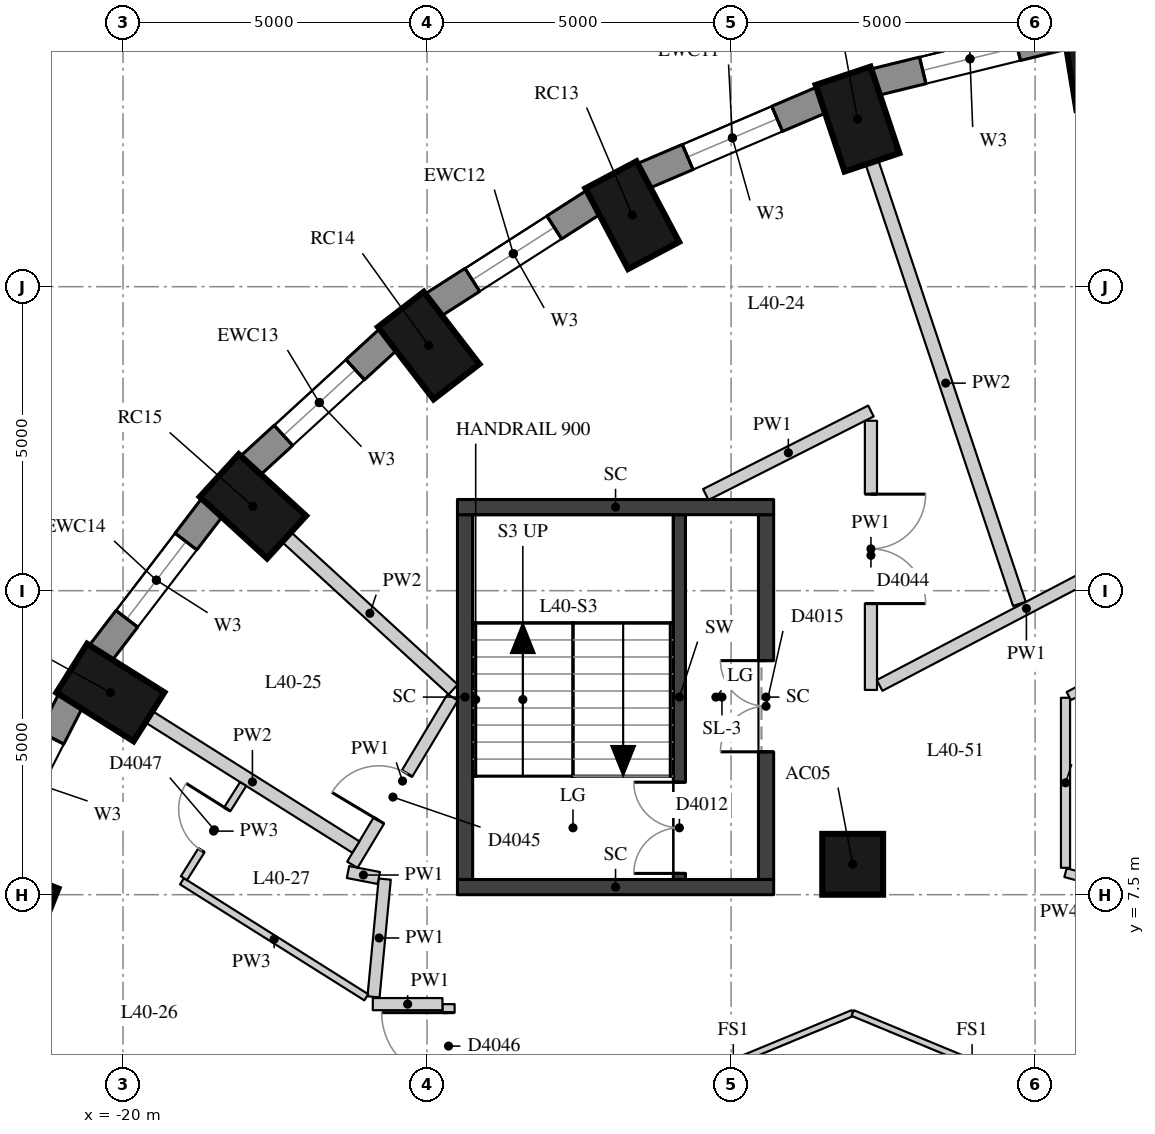
"""IFC4 building model, lengths in metres.
Left out: names, types, materials, properties, quantities, classifications, styles, units other than length and angle.
Written with IfcOpenShell. Run it as: python <this file> out.ifc"""

import sys

from ifc_helpers import new_model, si_unit, direction, frame, frame_2d, origin, origin_2d, place, context, subcontext, project, spatial, rectangle, extrude, element, fill, save


model = new_model("IFC4")
c1 = context("Model", 3, precision=1e-05, world=origin(), true_north=direction((0.0, 1.0)))
c2 = subcontext(c1, "Body", "Model", "MODEL_VIEW")
j1 = project(units=[si_unit("LENGTHUNIT", "METRE"), si_unit("PLANEANGLEUNIT", "RADIAN")], contexts=[c1])
p1 = place(None, origin())
s1 = spatial("IfcSite", under=j1, at=p1, CompositionType="ELEMENT")
p2 = place(p1, origin())
s2 = spatial("IfcBuilding", under=s1, at=p2, CompositionType="ELEMENT")
p3 = place(p2, frame((0.0, 0.0, 145.1)))
s3 = spatial("IfcBuildingStorey", under=s2, at=p3, CompositionType="ELEMENT", Elevation=145.1)
for number, where, z_axis, x_axis in (
    (1, (-3.972, 21.224, 0.0), (0.0, 0.0, 1.0), (-0.16, 0.987, 0.0)),
    (2, (-7.92, 20.256, 0.0), (0.0, 0.0, 1.0), (-0.317, 0.949, 0.0)),
    (3, (-11.625, 18.676, 0.0), (0.0, 0.0, 1.0), (-0.468, 0.884, 0.0)),
    (4, (-14.973, 16.532, 0.0), (0.0, 0.0, 1.0), (-0.61, 0.792, 0.0)),
    (5, (-17.864, 13.888, 0.0), (0.0, 0.0, 1.0), (-0.738, 0.675, 0.0)),
    (6, (-20.208, 10.825, 0.0), (0.0, 0.0, 1.0), (-0.846, 0.533, 0.0)),
    (7, (-21.936, 7.436, 0.0), (0.0, 0.0, 1.0), (-0.93, 0.369, 0.0)),
):
    element("IfcColumn", number, at=place(p3, frame(where, z_axis=z_axis, x_axis=x_axis)), inside=s3, PredefinedType="COLUMN", context=c2, shape_type="SweptSolid", body=[
        extrude(rectangle(XDim=1.5, YDim=0.95, at=origin_2d()), origin(), (0.0, 0.0, 1.0), 3.3),
    ])
p4 = place(p3, frame((-8.0, 8.0, 0.0), z_axis=(0.0, 0.0, 1.0), x_axis=(1.0, 0.0, 0.0)))
e8 = element("IfcColumn", 8, at=p4, inside=s3, PredefinedType="COLUMN", context=c2, shape_type="SweptSolid", body=[
    extrude(rectangle(XDim=1.0, YDim=1.0, at=origin_2d()), origin(), (0.0, 0.0, 1.0), 3.3),
])
p5 = place(p3, frame((-4.499, 21.633, 0.0), z_axis=(0.0, 0.0, 1.0), x_axis=(-0.971232901476, -0.238131583563, 0.0)))
e9 = element("IfcWall", 9, at=p5, inside=s3, PredefinedType="SOLIDWALL", context=c2, shape_type="SweptSolid", body=[
    extrude(rectangle(XDim=3.237, YDim=0.45, at=frame_2d((1.618, 0.0))), origin(), (0.0, 0.0, 1.0), 3.02),
])
p6 = place(p5, frame((0.818, 0.0, 0.4)))
e10 = element("IfcOpeningElement", 10, at=p6, cuts=e9, PredefinedType="OPENING", context=c2, shape_type="SweptSolid", body=[
    extrude(rectangle(XDim=1.6, YDim=1.75, at=frame_2d((0.8, 0.875))), frame((0.0, 0.235, 0.0), z_axis=(0.0, -1.0, 0.0), x_axis=(1.0, 0.0, 0.0)), (0.0, 0.0, 1.0), 0.47),
])
p7 = place(p3, frame((-8.506, 20.574, 0.0), z_axis=(0.0, 0.0, 1.0), x_axis=(-0.919798725687, -0.392390499663, 0.0)))
e11 = element("IfcWall", 11, at=p7, inside=s3, PredefinedType="SOLIDWALL", context=c2, shape_type="SweptSolid", body=[
    extrude(rectangle(XDim=3.2, YDim=0.45, at=frame_2d((1.6, 0.0))), origin(), (0.0, 0.0, 1.0), 3.02),
])
p8 = place(p7, frame((0.8, 0.0, 0.4)))
e12 = element("IfcOpeningElement", 12, at=p8, cuts=e11, PredefinedType="OPENING", context=c2, shape_type="SweptSolid", body=[
    extrude(rectangle(XDim=1.6, YDim=1.75, at=frame_2d((0.8, 0.875))), frame((0.0, 0.235, 0.0), z_axis=(0.0, -1.0, 0.0), x_axis=(1.0, 0.0, 0.0)), (0.0, 0.0, 1.0), 0.47),
])
p9 = place(p3, frame((-12.255, 18.893, 0.0), z_axis=(0.0, 0.0, 1.0), x_axis=(-0.842030726237, -0.539429565442, 0.0)))
e13 = element("IfcWall", 13, at=p9, inside=s3, PredefinedType="SOLIDWALL", context=c2, shape_type="SweptSolid", body=[
    extrude(rectangle(XDim=3.151, YDim=0.45, at=frame_2d((1.576, 0.0))), origin(), (0.0, 0.0, 1.0), 3.02),
])
p10 = place(p9, frame((0.776, 0.0, 0.4)))
e14 = element("IfcOpeningElement", 14, at=p10, cuts=e13, PredefinedType="OPENING", context=c2, shape_type="SweptSolid", body=[
    extrude(rectangle(XDim=1.6, YDim=1.75, at=frame_2d((0.8, 0.875))), frame((0.0, 0.235, 0.0), z_axis=(0.0, -1.0, 0.0), x_axis=(1.0, 0.0, 0.0)), (0.0, 0.0, 1.0), 0.47),
])
p11 = place(p3, frame((-15.63, 16.639, 0.0), z_axis=(0.0, 0.0, 1.0), x_axis=(-0.737808755941, -0.675009807082, 0.0)))
e15 = element("IfcWall", 15, at=p11, inside=s3, PredefinedType="SOLIDWALL", context=c2, shape_type="SweptSolid", body=[
    extrude(rectangle(XDim=3.094, YDim=0.45, at=frame_2d((1.547, 0.0))), origin(), (0.0, 0.0, 1.0), 3.02),
])
p12 = place(p11, frame((0.747, 0.0, 0.4)))
e16 = element("IfcOpeningElement", 16, at=p12, cuts=e15, PredefinedType="OPENING", context=c2, shape_type="SweptSolid", body=[
    extrude(rectangle(XDim=1.6, YDim=1.75, at=frame_2d((0.8, 0.875))), frame((0.0, 0.235, 0.0), z_axis=(0.0, -1.0, 0.0), x_axis=(1.0, 0.0, 0.0)), (0.0, 0.0, 1.0), 0.47),
])
p13 = place(p3, frame((-18.528, 13.879, 0.0), z_axis=(0.0, 0.0, 1.0), x_axis=(-0.607817056371, -0.794077090706, 0.0)))
e17 = element("IfcWall", 17, at=p13, inside=s3, PredefinedType="SOLIDWALL", context=c2, shape_type="SweptSolid", body=[
    extrude(rectangle(XDim=3.037, YDim=0.45, at=frame_2d((1.519, 0.0))), origin(), (0.0, 0.0, 1.0), 3.02),
])
p14 = place(p13, frame((0.719, 0.0, 0.4)))
e18 = element("IfcOpeningElement", 18, at=p14, cuts=e17, PredefinedType="OPENING", context=c2, shape_type="SweptSolid", body=[
    extrude(rectangle(XDim=1.6, YDim=1.75, at=frame_2d((0.8, 0.875))), frame((0.0, 0.235, 0.0), z_axis=(0.0, -1.0, 0.0), x_axis=(1.0, 0.0, 0.0)), (0.0, 0.0, 1.0), 0.47),
])
p15 = place(p3, frame((-20.859, 10.697, 0.0), z_axis=(0.0, 0.0, 1.0), x_axis=(-0.454133999889, -0.890933392653, 0.0)))
e19 = element("IfcWall", 19, at=p15, inside=s3, PredefinedType="SOLIDWALL", context=c2, shape_type="SweptSolid", body=[
    extrude(rectangle(XDim=2.986, YDim=0.45, at=frame_2d((1.493, 0.0))), origin(), (0.0, 0.0, 1.0), 3.02),
])
p16 = place(p15, frame((0.693, 0.0, 0.4)))
e20 = element("IfcOpeningElement", 20, at=p16, cuts=e19, PredefinedType="OPENING", context=c2, shape_type="SweptSolid", body=[
    extrude(rectangle(XDim=1.6, YDim=1.75, at=frame_2d((0.8, 0.875))), frame((0.0, 0.235, 0.0), z_axis=(0.0, -1.0, 0.0), x_axis=(1.0, 0.0, 0.0)), (0.0, 0.0, 1.0), 0.47),
])
p17 = place(p3, frame((-10.85, 7.75, 0.0), z_axis=(0.0, 0.0, 1.0), x_axis=(0.0, 1.0, 0.0)))
e21 = element("IfcWall", 21, at=p17, inside=s3, PredefinedType="SHEAR", context=c2, shape_type="SweptSolid", body=[
    extrude(rectangle(XDim=6.0, YDim=0.2, at=frame_2d((3.0, 0.0))), origin(), (0.0, 0.0, 1.0), 3.02),
])
p18 = place(p17, frame((0.1, 0.0, 0.0)))
e22 = element("IfcOpeningElement", 22, at=p18, cuts=e21, PredefinedType="OPENING", context=c2, shape_type="SweptSolid", body=[
    extrude(rectangle(XDim=1.5, YDim=2.1, at=frame_2d((0.75, 1.05))), frame((0.0, 0.11, 0.0), z_axis=(0.0, -1.0, 0.0), x_axis=(1.0, 0.0, 0.0)), (0.0, 0.0, 1.0), 0.22),
])
p19 = place(p3, frame((-14.375, 7.75, -0.28), z_axis=(0.0, 0.0, 1.0), x_axis=(0.0, 1.0, 0.0)))
e23 = element("IfcWall", 23, at=p19, inside=s3, PredefinedType="SHEAR", context=c2, shape_type="SweptSolid", body=[
    extrude(rectangle(XDim=6.0, YDim=0.25, at=frame_2d((3.0, 0.0))), origin(), (0.0, 0.0, 1.0), 3.3),
])
p20 = place(p3, frame((-9.425, 7.75, -0.28), z_axis=(0.0, 0.0, 1.0), x_axis=(0.0, 1.0, 0.0)))
e24 = element("IfcWall", 24, at=p20, inside=s3, PredefinedType="SHEAR", context=c2, shape_type="SweptSolid", body=[
    extrude(rectangle(XDim=6.0, YDim=0.25, at=frame_2d((3.0, 0.0))), origin(), (0.0, 0.0, 1.0), 3.3),
])
p21 = place(p20, frame((2.1, 0.0, 0.28)))
e25 = element("IfcOpeningElement", 25, at=p21, cuts=e24, PredefinedType="OPENING", context=c2, shape_type="SweptSolid", body=[
    extrude(rectangle(XDim=1.5, YDim=2.1, at=frame_2d((0.75, 1.05))), frame((0.0, 0.135, 0.0), z_axis=(0.0, -1.0, 0.0), x_axis=(1.0, 0.0, 0.0)), (0.0, 0.0, 1.0), 0.27),
])
for number, where, z_axis, x_axis in (
    (26, (-14.5, 13.875, -0.28), (0.0, 0.0, 1.0), (1.0, 0.0, 0.0)),
    (27, (-14.5, 7.625, -0.28), (0.0, 0.0, 1.0), (1.0, 0.0, 0.0)),
):
    element("IfcWall", number, at=place(p3, frame(where, z_axis=z_axis, x_axis=x_axis)), inside=s3, PredefinedType="SHEAR", context=c2, shape_type="SweptSolid", body=[
        extrude(rectangle(XDim=5.2, YDim=0.25, at=frame_2d((2.6, 0.0))), origin(), (0.0, 0.0, 1.0), 3.3),
    ])
p22 = place(p3, frame((-14.647, -5.6, 0.0), z_axis=(0.0, 0.0, 1.0), x_axis=(0.0, 1.0, 0.0)))
e28 = element("IfcWall", 28, at=p22, inside=s3, PredefinedType="PARTITIONING", context=c2, shape_type="SweptSolid", body=[
    extrude(rectangle(XDim=11.3, YDim=0.2, at=frame_2d((5.65, 0.0))), origin(), (0.0, 0.0, 1.0), 3.02),
])
p23 = place(p22, frame((10.06, 0.0, 0.0)))
e29 = element("IfcOpeningElement", 29, at=p23, cuts=e28, PredefinedType="OPENING", context=c2, shape_type="SweptSolid", body=[
    extrude(rectangle(XDim=1.1, YDim=2.1, at=frame_2d((0.55, 1.05))), frame((0.0, 0.11, 0.0), z_axis=(0.0, -1.0, 0.0), x_axis=(1.0, 0.0, 0.0)), (0.0, 0.0, 1.0), 0.22),
])
p24 = place(p22, frame((3.639, 0.0, 0.0)))
e30 = element("IfcOpeningElement", 30, at=p24, cuts=e28, PredefinedType="OPENING", context=c2, shape_type="SweptSolid", body=[
    extrude(rectangle(XDim=1.2, YDim=2.1, at=frame_2d((0.6, 1.05))), frame((0.0, 0.11, 0.0), z_axis=(0.0, -1.0, 0.0), x_axis=(1.0, 0.0, 0.0)), (0.0, 0.0, 1.0), 0.22),
])
p25 = place(p22, frame((0.14, 0.0, 0.0)))
e31 = element("IfcOpeningElement", 31, at=p25, cuts=e28, PredefinedType="OPENING", context=c2, shape_type="SweptSolid", body=[
    extrude(rectangle(XDim=0.9, YDim=2.1, at=frame_2d((0.45, 1.05))), frame((0.0, 0.11, 0.0), z_axis=(0.0, -1.0, 0.0), x_axis=(1.0, 0.0, 0.0)), (0.0, 0.0, 1.0), 0.22),
])
p26 = place(p3, frame((-14.747, 5.7, 0.0), z_axis=(0.0, 0.0, 1.0), x_axis=(-1.0, 0.0, 0.0)))
e32 = element("IfcWall", 32, at=p26, inside=s3, PredefinedType="PARTITIONING", context=c2, shape_type="SweptSolid", body=[
    extrude(rectangle(XDim=1.145, YDim=0.2, at=frame_2d((0.573, 0.0))), origin(), (0.0, 0.0, 1.0), 3.02),
])
p27 = place(p3, frame((-15.88, 5.82, 0.0), z_axis=(0.0, 0.0, 1.0), x_axis=(0.094892019157, 0.995487571344, 0.0)))
e33 = element("IfcWall", 33, at=p27, inside=s3, PredefinedType="PARTITIONING", context=c2, shape_type="SweptSolid", body=[
    extrude(rectangle(XDim=1.945, YDim=0.2, at=frame_2d((0.973, 0.0))), origin(), (0.0, 0.0, 1.0), 3.02),
])
p28 = place(p3, frame((-15.793, 7.775, 0.0), z_axis=(0.0, 0.0, 1.0), x_axis=(-0.981833914825, 0.189742361371, 0.0)))
e34 = element("IfcWall", 34, at=p28, inside=s3, PredefinedType="PARTITIONING", context=c2, shape_type="SweptSolid", body=[
    extrude(rectangle(XDim=0.516, YDim=0.2, at=frame_2d((0.258, 0.0))), origin(), (0.0, 0.0, 1.0), 3.02),
])
p29 = place(p3, frame((-16.228, 7.992, 0.0), z_axis=(0.0, 0.0, 1.0), x_axis=(0.513936465122, 0.857828251935, 0.0)))
e35 = element("IfcWall", 35, at=p29, inside=s3, PredefinedType="PARTITIONING", context=c2, shape_type="SweptSolid", body=[
    extrude(rectangle(XDim=3.21, YDim=0.2, at=frame_2d((1.605, 0.0))), origin(), (0.0, 0.0, 1.0), 3.02),
])
p30 = place(p29, frame((0.848, 0.0, 0.0)))
e36 = element("IfcOpeningElement", 36, at=p30, cuts=e35, PredefinedType="OPENING", context=c2, shape_type="SweptSolid", body=[
    extrude(rectangle(XDim=0.9, YDim=2.1, at=frame_2d((0.45, 1.05))), frame((0.0, 0.11, 0.0), z_axis=(0.0, -1.0, 0.0), x_axis=(1.0, 0.0, 0.0)), (0.0, 0.0, 1.0), 0.22),
])
p31 = place(p3, frame((-10.416, 14.082, 0.0), z_axis=(0.0, 0.0, 1.0), x_axis=(0.892396808139, 0.451251522793, 0.0)))
e37 = element("IfcWall", 37, at=p31, inside=s3, PredefinedType="PARTITIONING", context=c2, shape_type="SweptSolid", body=[
    extrude(rectangle(XDim=3.044, YDim=0.2, at=frame_2d((1.522, 0.0))), origin(), (0.0, 0.0, 1.0), 3.02),
])
p32 = place(p3, frame((-7.7, 15.295, 0.0), z_axis=(0.0, 0.0, 1.0), x_axis=(0.0, -1.0, 0.0)))
e38 = element("IfcWall", 38, at=p32, inside=s3, PredefinedType="PARTITIONING", context=c2, shape_type="SweptSolid", body=[
    extrude(rectangle(XDim=4.427, YDim=0.2, at=frame_2d((2.214, 0.0))), origin(), (0.0, 0.0, 1.0), 3.02),
])
p33 = place(p32, frame((1.207, 0.0, 0.0)))
e39 = element("IfcOpeningElement", 39, at=p33, cuts=e38, PredefinedType="OPENING", context=c2, shape_type="SweptSolid", body=[
    extrude(rectangle(XDim=1.8, YDim=2.1, at=frame_2d((0.9, 1.05))), frame((0.0, 0.11, 0.0), z_axis=(0.0, -1.0, 0.0), x_axis=(1.0, 0.0, 0.0)), (0.0, 0.0, 1.0), 0.22),
])
p34 = place(p3, frame((-7.557, 10.942, 0.0), z_axis=(0.0, 0.0, 1.0), x_axis=(0.885672830659, 0.464309850244, 0.0)))
e40 = element("IfcWall", 40, at=p34, inside=s3, PredefinedType="PARTITIONING", context=c2, shape_type="SweptSolid", body=[
    extrude(rectangle(XDim=5.452, YDim=0.2, at=frame_2d((2.726, 0.0))), origin(), (0.0, 0.0, 1.0), 3.02),
])
p35 = place(p3, frame((-3.639, 7.631, 0.0), z_axis=(0.0, 0.0, 1.0), x_axis=(-0.965879594242, 0.258991523853, 0.0)))
e41 = element("IfcWall", 41, at=p35, inside=s3, PredefinedType="PARTITIONING", context=c2, shape_type="SweptSolid", body=[
    extrude(rectangle(XDim=0.892, YDim=0.15, at=frame_2d((0.446, 0.0))), origin(), (0.0, 0.0, 1.0), 3.02),
])
p36 = place(p3, frame((-4.5, 7.942, 0.0), z_axis=(0.0, 0.0, 1.0), x_axis=(0.0, 1.0, 0.0)))
e42 = element("IfcWall", 42, at=p36, inside=s3, PredefinedType="PARTITIONING", context=c2, shape_type="SweptSolid", body=[
    extrude(rectangle(XDim=2.796, YDim=0.15, at=frame_2d((1.398, 0.0))), origin(), (0.0, 0.0, 1.0), 3.02),
])
p37 = place(p3, frame((-4.447, 10.766, 0.0), z_axis=(0.0, 0.0, 1.0), x_axis=(0.885701482048, 0.464255193507, 0.0)))
e43 = element("IfcWall", 43, at=p37, inside=s3, PredefinedType="PARTITIONING", context=c2, shape_type="SweptSolid", body=[
    extrude(rectangle(XDim=2.315, YDim=0.15, at=frame_2d((1.158, 0.0))), origin(), (0.0, 0.0, 1.0), 3.02),
])
p38 = place(p3, frame((-7.683, 19.545, 0.0), z_axis=(0.0, 0.0, 1.0), x_axis=(0.316706037399, -0.94852374028, 0.0)))
e44 = element("IfcWall", 44, at=p38, inside=s3, PredefinedType="PARTITIONING", context=c2, shape_type="SweptSolid", body=[
    extrude(rectangle(XDim=7.656, YDim=0.22, at=frame_2d((3.828, 0.0))), origin(), (0.0, 0.0, 1.0), 3.02),
])
p39 = place(p3, frame((-17.31, 13.382, 0.0), z_axis=(0.0, 0.0, 1.0), x_axis=(0.737860436015, -0.674953314655, 0.0)))
e45 = element("IfcWall", 45, at=p39, inside=s3, PredefinedType="PARTITIONING", context=c2, shape_type="SweptSolid", body=[
    extrude(rectangle(XDim=3.714, YDim=0.22, at=frame_2d((1.857, 0.0))), origin(), (0.0, 0.0, 1.0), 3.02),
])
p40 = place(p3, frame((-19.573, 10.426, 0.0), z_axis=(0.0, 0.0, 1.0), x_axis=(0.846298736827, -0.532708595805, 0.0)))
e46 = element("IfcWall", 46, at=p40, inside=s3, PredefinedType="PARTITIONING", context=c2, shape_type="SweptSolid", body=[
    extrude(rectangle(XDim=4.021, YDim=0.22, at=frame_2d((2.011, 0.0))), origin(), (0.0, 0.0, 1.0), 3.02),
])
p41 = place(p3, frame((-16.0, 5.813, 0.0), z_axis=(0.0, 0.0, 1.0), x_axis=(-0.846339825068, 0.53264331452, 0.0)))
e47 = element("IfcWall", 47, at=p41, inside=s3, PredefinedType="PARTITIONING", context=c2, shape_type="SweptSolid", body=[
    extrude(rectangle(XDim=3.582, YDim=0.12, at=frame_2d((1.791, 0.0))), origin(), (0.0, 0.0, 1.0), 3.02),
])
p42 = place(p3, frame((-18.999, 7.771, 0.0), z_axis=(0.0, 0.0, 1.0), x_axis=(0.532431076319, 0.84647335987, 0.0)))
e48 = element("IfcWall", 48, at=p42, inside=s3, PredefinedType="PARTITIONING", context=c2, shape_type="SweptSolid", body=[
    extrude(rectangle(XDim=1.83, YDim=0.12, at=frame_2d((0.915, 0.0))), origin(), (0.0, 0.0, 1.0), 3.02),
])
p43 = place(p42, frame((0.54, 0.0, 0.0)))
e49 = element("IfcOpeningElement", 49, at=p43, cuts=e48, PredefinedType="OPENING", context=c2, shape_type="SweptSolid", body=[
    extrude(rectangle(XDim=0.8, YDim=2.1, at=frame_2d((0.4, 1.05))), frame((0.0, 0.07, 0.0), z_axis=(0.0, -1.0, 0.0), x_axis=(1.0, 0.0, 0.0)), (0.0, 0.0, 1.0), 0.14),
])
for number, where, z_axis, x_axis in (
    (50, (-11.927, 3.927, 0.0), (0.0, 0.0, 1.0), (0.924, 0.383, 0.0)),
    (51, (-8.0, 5.554, 0.0), (0.0, 0.0, 1.0), (0.924, -0.383, 0.0)),
):
    element("IfcWall", number, at=place(p3, frame(where, z_axis=z_axis, x_axis=x_axis)), inside=s3, PredefinedType="PARTITIONING", context=c2, shape_type="SweptSolid", body=[
        extrude(rectangle(XDim=4.251, YDim=0.1, at=frame_2d((2.125, 0.0))), origin(), (0.0, 0.0, 1.0), 3.02),
    ])
p44 = place(p6, origin())
e52 = element("IfcWindow", 52, at=p44, inside=s3, PartitioningType="SINGLE_PANEL", PredefinedType="WINDOW", context=c2, shape_type="SweptSolid", body=[
    extrude(rectangle(XDim=1.6, YDim=1.75, at=frame_2d((0.8, 0.875))), frame((0.0, 0.035, 0.0), z_axis=(0.0, -1.0, 0.0), x_axis=(1.0, 0.0, 0.0)), (0.0, 0.0, 1.0), 0.06),
])
fill(e10, e52)
p45 = place(p8, origin())
e53 = element("IfcWindow", 53, at=p45, inside=s3, PartitioningType="SINGLE_PANEL", PredefinedType="WINDOW", context=c2, shape_type="SweptSolid", body=[
    extrude(rectangle(XDim=1.6, YDim=1.75, at=frame_2d((0.8, 0.875))), frame((0.0, 0.035, 0.0), z_axis=(0.0, -1.0, 0.0), x_axis=(1.0, 0.0, 0.0)), (0.0, 0.0, 1.0), 0.06),
])
fill(e12, e53)
p46 = place(p10, origin())
e54 = element("IfcWindow", 54, at=p46, inside=s3, PartitioningType="SINGLE_PANEL", PredefinedType="WINDOW", context=c2, shape_type="SweptSolid", body=[
    extrude(rectangle(XDim=1.6, YDim=1.75, at=frame_2d((0.8, 0.875))), frame((0.0, 0.035, 0.0), z_axis=(0.0, -1.0, 0.0), x_axis=(1.0, 0.0, 0.0)), (0.0, 0.0, 1.0), 0.06),
])
fill(e14, e54)
p47 = place(p12, origin())
e55 = element("IfcWindow", 55, at=p47, inside=s3, PartitioningType="SINGLE_PANEL", PredefinedType="WINDOW", context=c2, shape_type="SweptSolid", body=[
    extrude(rectangle(XDim=1.6, YDim=1.75, at=frame_2d((0.8, 0.875))), frame((0.0, 0.035, 0.0), z_axis=(0.0, -1.0, 0.0), x_axis=(1.0, 0.0, 0.0)), (0.0, 0.0, 1.0), 0.06),
])
fill(e16, e55)
p48 = place(p14, origin())
e56 = element("IfcWindow", 56, at=p48, inside=s3, PartitioningType="SINGLE_PANEL", PredefinedType="WINDOW", context=c2, shape_type="SweptSolid", body=[
    extrude(rectangle(XDim=1.6, YDim=1.75, at=frame_2d((0.8, 0.875))), frame((0.0, 0.035, 0.0), z_axis=(0.0, -1.0, 0.0), x_axis=(1.0, 0.0, 0.0)), (0.0, 0.0, 1.0), 0.06),
])
fill(e18, e56)
p49 = place(p16, origin())
e57 = element("IfcWindow", 57, at=p49, inside=s3, PartitioningType="SINGLE_PANEL", PredefinedType="WINDOW", context=c2, shape_type="SweptSolid", body=[
    extrude(rectangle(XDim=1.6, YDim=1.75, at=frame_2d((0.8, 0.875))), frame((0.0, 0.035, 0.0), z_axis=(0.0, -1.0, 0.0), x_axis=(1.0, 0.0, 0.0)), (0.0, 0.0, 1.0), 0.06),
])
fill(e20, e57)
p50 = place(p18, origin())
e58 = element("IfcDoor", 58, at=p50, inside=s3, OperationType="DOUBLE_DOOR_SINGLE_SWING", PredefinedType="DOOR", context=c2, shape_type="SweptSolid", body=[
    extrude(rectangle(XDim=1.5, YDim=2.1, at=frame_2d((0.75, 1.05))), frame((0.0, 0.025, 0.0), z_axis=(0.0, -1.0, 0.0), x_axis=(1.0, 0.0, 0.0)), (0.0, 0.0, 1.0), 0.05),
])
fill(e22, e58)
p51 = place(p21, origin())
e59 = element("IfcDoor", 59, at=p51, inside=s3, OperationType="DOUBLE_DOOR_SINGLE_SWING", PredefinedType="DOOR", context=c2, shape_type="SweptSolid", body=[
    extrude(rectangle(XDim=1.5, YDim=2.1, at=frame_2d((0.75, 1.05))), frame((0.0, 0.025, 0.0), z_axis=(0.0, -1.0, 0.0), x_axis=(1.0, 0.0, 0.0)), (0.0, 0.0, 1.0), 0.05),
])
fill(e25, e59)
p52 = place(p33, origin())
e60 = element("IfcDoor", 60, at=p52, inside=s3, OperationType="DOUBLE_DOOR_SINGLE_SWING", PredefinedType="DOOR", context=c2, shape_type="SweptSolid", body=[
    extrude(rectangle(XDim=1.8, YDim=2.1, at=frame_2d((0.9, 1.05))), frame((0.0, 0.025, 0.0), z_axis=(0.0, -1.0, 0.0), x_axis=(1.0, 0.0, 0.0)), (0.0, 0.0, 1.0), 0.05),
])
fill(e39, e60)
p53 = place(p30, origin())
e61 = element("IfcDoor", 61, at=p53, inside=s3, OperationType="SINGLE_SWING_LEFT", PredefinedType="DOOR", context=c2, shape_type="SweptSolid", body=[
    extrude(rectangle(XDim=0.9, YDim=2.1, at=frame_2d((0.45, 1.05))), frame((0.0, 0.025, 0.0), z_axis=(0.0, -1.0, 0.0), x_axis=(1.0, 0.0, 0.0)), (0.0, 0.0, 1.0), 0.05),
])
fill(e36, e61)
p54 = place(p23, origin())
e62 = element("IfcDoor", 62, at=p54, inside=s3, OperationType="SINGLE_SWING_RIGHT", PredefinedType="DOOR", context=c2, shape_type="SweptSolid", body=[
    extrude(rectangle(XDim=1.1, YDim=2.1, at=frame_2d((0.55, 1.05))), frame((0.0, 0.025, 0.0), z_axis=(0.0, -1.0, 0.0), x_axis=(1.0, 0.0, 0.0)), (0.0, 0.0, 1.0), 0.05),
])
fill(e29, e62)
p55 = place(p43, origin())
e63 = element("IfcDoor", 63, at=p55, inside=s3, OperationType="SINGLE_SWING_RIGHT", PredefinedType="DOOR", context=c2, shape_type="SweptSolid", body=[
    extrude(rectangle(XDim=0.8, YDim=2.1, at=frame_2d((0.4, 1.05))), frame((0.0, 0.025, 0.0), z_axis=(0.0, -1.0, 0.0), x_axis=(1.0, 0.0, 0.0)), (0.0, 0.0, 1.0), 0.05),
])
fill(e49, e63)
save(model, sys.argv[1])
